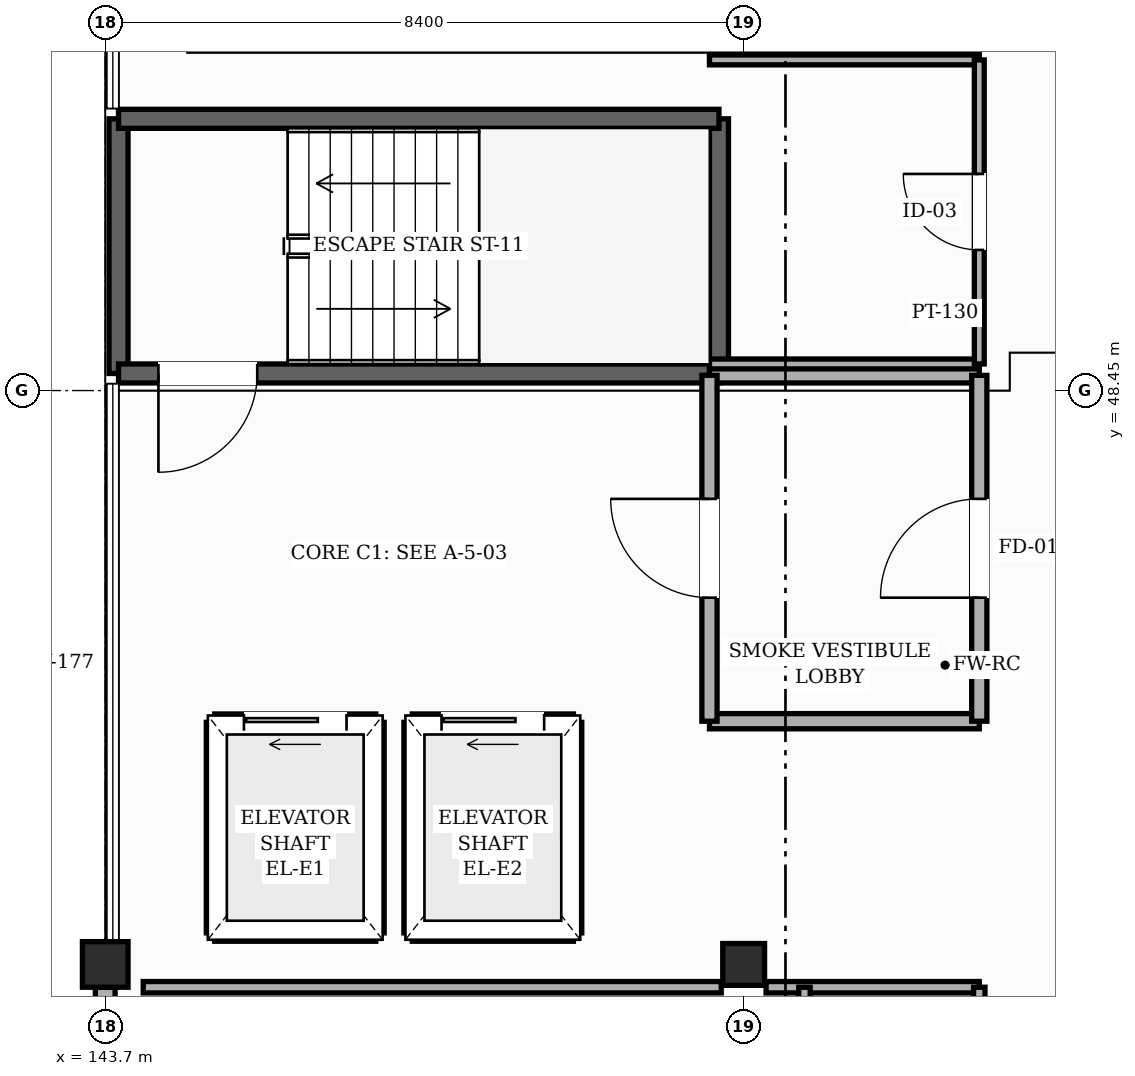
"""IFC4 building model, lengths in metres.
Left out: names, types, materials, properties, quantities, classifications, styles, units other than length and angle.
Written with IfcOpenShell. Run it as: python <this file> out.ifc"""

import sys

from ifc_helpers import new_model, si_unit, direction, frame, frame_2d, origin, origin_2d, place, context, subcontext, project, spatial, rectangle, hollow_rectangle, extrude, element, fill, save


model = new_model("IFC4")
c1 = context("Model", 3, precision=1e-05, world=origin(), true_north=direction((0.0, 1.0)))
c2 = subcontext(c1, "Body", "Model", "MODEL_VIEW")
j1 = project(units=[si_unit("LENGTHUNIT", "METRE"), si_unit("PLANEANGLEUNIT", "RADIAN")], contexts=[c1])
p1 = place(None, origin())
s1 = spatial("IfcSite", under=j1, at=p1, CompositionType="ELEMENT")
p2 = place(p1, origin())
s2 = spatial("IfcBuilding", under=s1, at=p2, CompositionType="ELEMENT")
p3 = place(p2, frame((0.0, 0.0, 24.6)))
s3 = spatial("IfcBuildingStorey", under=s2, at=p3, CompositionType="ELEMENT", Elevation=24.6)
p4 = place(p3, frame((143.7, 40.9, 0.0), z_axis=(0.0, 0.0, 1.0), x_axis=(1.0, 0.0, 0.0)))
e1 = element("IfcColumn", 1, at=p4, inside=s3, PredefinedType="COLUMN", context=c2, shape_type="SweptSolid", body=[
    extrude(hollow_rectangle(XDim=0.6, YDim=0.6, WallThickness=0.025, InnerFilletRadius=0.025, OuterFilletRadius=0.05, at=origin_2d()), origin(), (0.0, 0.0, 1.0), 3.6),
])
p5 = place(p3, frame((152.1, 40.9, 0.0), z_axis=(0.0, 0.0, 1.0), x_axis=(1.0, 0.0, 0.0)))
e2 = element("IfcColumn", 2, at=p5, inside=s3, PredefinedType="COLUMN", context=c2, shape_type="SweptSolid", body=[
    extrude(hollow_rectangle(XDim=0.55, YDim=0.55, WallThickness=0.022, InnerFilletRadius=0.022, OuterFilletRadius=0.044, at=origin_2d()), origin(), (0.0, 0.0, 1.0), 3.6),
])
p6 = place(p3, frame((143.7, 32.3, 0.0), z_axis=(0.0, 0.0, 1.0), x_axis=(0.0, 1.0, 0.0)))
e3 = element("IfcWall", 3, at=p6, inside=s3, PredefinedType="SOLIDWALL", context=c2, shape_type="SweptSolid", body=[
    extrude(rectangle(XDim=8.3, YDim=0.26, at=frame_2d((4.15, 0.0))), origin(), (0.0, 0.0, 1.0), 2.655),
])
p7 = place(p6, frame((0.325, 0.0, 0.85)))
e4 = element("IfcOpeningElement", 4, at=p7, cuts=e3, PredefinedType="OPENING", context=c2, shape_type="SweptSolid", body=[
    extrude(rectangle(XDim=0.85, YDim=1.35, at=frame_2d((0.425, 0.675))), frame((0.0, 0.14, 0.0), z_axis=(0.0, -1.0, 0.0), x_axis=(1.0, 0.0, 0.0)), (0.0, 0.0, 1.0), 0.28),
])
p8 = place(p6, frame((2.475, 0.0, 0.85)))
e5 = element("IfcOpeningElement", 5, at=p8, cuts=e3, PredefinedType="OPENING", context=c2, shape_type="SweptSolid", body=[
    extrude(rectangle(XDim=1.45, YDim=1.35, at=frame_2d((0.725, 0.675))), frame((0.0, 0.14, 0.0), z_axis=(0.0, -1.0, 0.0), x_axis=(1.0, 0.0, 0.0)), (0.0, 0.0, 1.0), 0.28),
])
p9 = place(p6, frame((5.775, 0.0, 0.85)))
e6 = element("IfcOpeningElement", 6, at=p9, cuts=e3, PredefinedType="OPENING", context=c2, shape_type="SweptSolid", body=[
    extrude(rectangle(XDim=1.65, YDim=1.35, at=frame_2d((0.825, 0.675))), frame((0.0, 0.14, 0.0), z_axis=(0.0, -1.0, 0.0), x_axis=(1.0, 0.0, 0.0)), (0.0, 0.0, 1.0), 0.28),
])
for number, where, z_axis, x_axis in (
    (7, (143.875, 48.675, 0.0), (0.0, 0.0, 1.0), (0.0, 1.0, 0.0)),
    (8, (151.775, 52.025, 0.0), (0.0, 0.0, 1.0), (0.0, -1.0, 0.0)),
):
    element("IfcWall", number, at=place(p3, frame(where, z_axis=z_axis, x_axis=x_axis)), inside=s3, PredefinedType="SHEAR", context=c2, shape_type="SweptSolid", body=[
        extrude(rectangle(XDim=3.35, YDim=0.25, at=frame_2d((1.675, 0.0))), origin(), (0.0, 0.0, 1.0), 3.38),
    ])
p10 = place(p3, frame((151.775, 48.675, 0.0), z_axis=(0.0, 0.0, 1.0), x_axis=(-1.0, 0.0, 0.0)))
e9 = element("IfcWall", 9, at=p10, inside=s3, PredefinedType="SHEAR", context=c2, shape_type="SweptSolid", body=[
    extrude(rectangle(XDim=7.9, YDim=0.25, at=frame_2d((3.95, 0.0))), origin(), (0.0, 0.0, 1.0), 3.38),
])
p11 = place(p10, frame((6.075, 0.0, 0.0)))
e10 = element("IfcOpeningElement", 10, at=p11, cuts=e9, PredefinedType="OPENING", context=c2, shape_type="SweptSolid", body=[
    extrude(rectangle(XDim=1.3, YDim=2.2, at=frame_2d((0.65, 1.1))), frame((0.0, 0.135, 0.0), z_axis=(0.0, -1.0, 0.0), x_axis=(1.0, 0.0, 0.0)), (0.0, 0.0, 1.0), 0.27),
])
p12 = place(p3, frame((143.875, 52.025, 0.0), z_axis=(0.0, 0.0, 1.0), x_axis=(1.0, 0.0, 0.0)))
e11 = element("IfcWall", 11, at=p12, inside=s3, PredefinedType="SHEAR", context=c2, shape_type="SweptSolid", body=[
    extrude(rectangle(XDim=7.9, YDim=0.25, at=frame_2d((3.95, 0.0))), origin(), (0.0, 0.0, 1.0), 3.38),
])
p13 = place(p3, frame((145.14, 44.085, 0.0), z_axis=(0.0, 0.0, 1.0), x_axis=(1.0, 0.0, 0.0)))
e12 = element("IfcWall", 12, at=p13, inside=s3, PredefinedType="SHEAR", context=c2, shape_type="SweptSolid", body=[
    extrude(rectangle(XDim=2.12, YDim=0.22, at=frame_2d((1.06, 0.0))), origin(), (0.0, 0.0, 1.0), 3.38),
])
p14 = place(p13, frame((0.385, 0.0, 0.0)))
e13 = element("IfcOpeningElement", 13, at=p14, cuts=e12, PredefinedType="OPENING", context=c2, shape_type="SweptSolid", body=[
    extrude(rectangle(XDim=1.35, YDim=2.3, at=frame_2d((0.675, 1.15))), frame((0.0, 0.12, 0.0), z_axis=(0.0, -1.0, 0.0), x_axis=(1.0, 0.0, 0.0)), (0.0, 0.0, 1.0), 0.24),
])
p15 = place(p3, frame((145.14, 41.315, 0.0), z_axis=(0.0, 0.0, 1.0), x_axis=(1.0, 0.0, 0.0)))
e14 = element("IfcWall", 14, at=p15, inside=s3, PredefinedType="SHEAR", context=c2, shape_type="SweptSolid", body=[
    extrude(rectangle(XDim=2.12, YDim=0.22, at=frame_2d((1.06, 0.0))), origin(), (0.0, 0.0, 1.0), 3.38),
])
for number, where, z_axis, x_axis in (
    (15, (147.26, 41.315, 0.0), (0.0, 0.0, 1.0), (0.0, 1.0, 0.0)),
    (16, (145.14, 41.315, 0.0), (0.0, 0.0, 1.0), (0.0, 1.0, 0.0)),
):
    element("IfcWall", number, at=place(p3, frame(where, z_axis=z_axis, x_axis=x_axis)), inside=s3, PredefinedType="SHEAR", context=c2, shape_type="SweptSolid", body=[
        extrude(rectangle(XDim=2.77, YDim=0.22, at=frame_2d((1.385, 0.0))), origin(), (0.0, 0.0, 1.0), 3.38),
    ])
p16 = place(p3, frame((147.74, 44.085, 0.0), z_axis=(0.0, 0.0, 1.0), x_axis=(1.0, 0.0, 0.0)))
e17 = element("IfcWall", 17, at=p16, inside=s3, PredefinedType="SHEAR", context=c2, shape_type="SweptSolid", body=[
    extrude(rectangle(XDim=2.12, YDim=0.22, at=frame_2d((1.06, 0.0))), origin(), (0.0, 0.0, 1.0), 3.38),
])
p17 = place(p16, frame((0.385, 0.0, 0.0)))
e18 = element("IfcOpeningElement", 18, at=p17, cuts=e17, PredefinedType="OPENING", context=c2, shape_type="SweptSolid", body=[
    extrude(rectangle(XDim=1.35, YDim=2.3, at=frame_2d((0.675, 1.15))), frame((0.0, 0.12, 0.0), z_axis=(0.0, -1.0, 0.0), x_axis=(1.0, 0.0, 0.0)), (0.0, 0.0, 1.0), 0.24),
])
p18 = place(p3, frame((147.74, 41.315, 0.0), z_axis=(0.0, 0.0, 1.0), x_axis=(1.0, 0.0, 0.0)))
e19 = element("IfcWall", 19, at=p18, inside=s3, PredefinedType="SHEAR", context=c2, shape_type="SweptSolid", body=[
    extrude(rectangle(XDim=2.12, YDim=0.22, at=frame_2d((1.06, 0.0))), origin(), (0.0, 0.0, 1.0), 3.38),
])
for number, where, z_axis, x_axis in (
    (20, (149.86, 41.315, 0.0), (0.0, 0.0, 1.0), (0.0, 1.0, 0.0)),
    (21, (147.74, 41.315, 0.0), (0.0, 0.0, 1.0), (0.0, 1.0, 0.0)),
):
    element("IfcWall", number, at=place(p3, frame(where, z_axis=z_axis, x_axis=x_axis)), inside=s3, PredefinedType="SHEAR", context=c2, shape_type="SweptSolid", body=[
        extrude(rectangle(XDim=2.77, YDim=0.22, at=frame_2d((1.385, 0.0))), origin(), (0.0, 0.0, 1.0), 3.38),
    ])
p19 = place(p3, frame((144.2, 40.6, 0.0), z_axis=(0.0, 0.0, 1.0), x_axis=(1.0, 0.0, 0.0)))
e22 = element("IfcWall", 22, at=p19, inside=s3, PredefinedType="PARTITIONING", context=c2, shape_type="SweptSolid", body=[
    extrude(rectangle(XDim=7.605, YDim=0.15, at=frame_2d((3.802, 0.0))), origin(), (0.0, 0.0, 1.0), 2.805),
])
p20 = place(p3, frame((152.395, 40.6, 0.0), z_axis=(0.0, 0.0, 1.0), x_axis=(1.0, 0.0, 0.0)))
e23 = element("IfcWall", 23, at=p20, inside=s3, PredefinedType="PARTITIONING", context=c2, shape_type="SweptSolid", body=[
    extrude(rectangle(XDim=2.805, YDim=0.15, at=frame_2d((1.402, 0.0))), origin(), (0.0, 0.0, 1.0), 2.805),
])
for number, where, z_axis, x_axis in (
    (24, (151.65, 44.1, 0.0), (0.0, 0.0, 1.0), (1.0, 0.0, 0.0)),
    (25, (151.65, 48.65, 0.0), (0.0, 0.0, 1.0), (1.0, 0.0, 0.0)),
):
    element("IfcWall", number, at=place(p3, frame(where, z_axis=z_axis, x_axis=x_axis)), inside=s3, PredefinedType="SOLIDWALL", context=c2, shape_type="SweptSolid", body=[
        extrude(rectangle(XDim=3.55, YDim=0.2, at=frame_2d((1.775, 0.0))), origin(), (0.0, 0.0, 1.0), 3.365),
    ])
for number, where, z_axis, x_axis in (
    (26, (151.65, 48.8, 0.0), (0.0, 0.0, 1.0), (1.0, 0.0, 0.0)),
    (27, (151.65, 52.8, 0.0), (0.0, 0.0, 1.0), (1.0, 0.0, 0.0)),
):
    element("IfcWall", number, at=place(p3, frame(where, z_axis=z_axis, x_axis=x_axis)), inside=s3, PredefinedType="PARTITIONING", context=c2, shape_type="SweptSolid", body=[
        extrude(rectangle(XDim=3.55, YDim=0.13, at=frame_2d((1.775, 0.0))), origin(), (0.0, 0.0, 1.0), 3.365),
    ])
p21 = place(p3, frame((151.65, 44.1, 0.0), z_axis=(0.0, 0.0, 1.0), x_axis=(0.0, 1.0, 0.0)))
e28 = element("IfcWall", 28, at=p21, inside=s3, PredefinedType="SOLIDWALL", context=c2, shape_type="SweptSolid", body=[
    extrude(rectangle(XDim=4.55, YDim=0.2, at=frame_2d((2.275, 0.0))), origin(), (0.0, 0.0, 1.0), 3.365),
])
p22 = place(p21, frame((1.625, 0.0, 0.0)))
e29 = element("IfcOpeningElement", 29, at=p22, cuts=e28, PredefinedType="OPENING", context=c2, shape_type="SweptSolid", body=[
    extrude(rectangle(XDim=1.3, YDim=2.2, at=frame_2d((0.65, 1.1))), frame((0.0, 0.11, 0.0), z_axis=(0.0, -1.0, 0.0), x_axis=(1.0, 0.0, 0.0)), (0.0, 0.0, 1.0), 0.22),
])
p23 = place(p3, frame((152.9, 38.95, 0.0), z_axis=(0.0, 0.0, 1.0), x_axis=(0.0, 1.0, 0.0)))
e30 = element("IfcWall", 30, at=p23, inside=s3, PredefinedType="PARTITIONING", context=c2, shape_type="SweptSolid", body=[
    extrude(rectangle(XDim=1.65, YDim=0.15, at=frame_2d((0.825, 0.0))), origin(), (0.0, 0.0, 1.0), 3.365),
])
p24 = place(p3, frame((155.2, 30.4, 0.0), z_axis=(0.0, 0.0, 1.0), x_axis=(0.0, 1.0, 0.0)))
e31 = element("IfcWall", 31, at=p24, inside=s3, PredefinedType="PARTITIONING", context=c2, shape_type="SweptSolid", body=[
    extrude(rectangle(XDim=10.2, YDim=0.15, at=frame_2d((5.1, 0.0))), origin(), (0.0, 0.0, 1.0), 3.365),
])
p25 = place(p24, frame((0.4, 0.0, 0.0)))
e32 = element("IfcOpeningElement", 32, at=p25, cuts=e31, PredefinedType="OPENING", context=c2, shape_type="SweptSolid", body=[
    extrude(rectangle(XDim=0.95, YDim=2.15, at=frame_2d((0.475, 1.075))), frame((0.0, 0.085, 0.0), z_axis=(0.0, -1.0, 0.0), x_axis=(1.0, 0.0, 0.0)), (0.0, 0.0, 1.0), 0.17),
])
p26 = place(p24, frame((3.8, 0.0, 0.0)))
e33 = element("IfcOpeningElement", 33, at=p26, cuts=e31, PredefinedType="OPENING", context=c2, shape_type="SweptSolid", body=[
    extrude(rectangle(XDim=0.95, YDim=2.15, at=frame_2d((0.475, 1.075))), frame((0.0, 0.085, 0.0), z_axis=(0.0, -1.0, 0.0), x_axis=(1.0, 0.0, 0.0)), (0.0, 0.0, 1.0), 0.17),
])
p27 = place(p24, frame((7.2, 0.0, 0.0)))
e34 = element("IfcOpeningElement", 34, at=p27, cuts=e31, PredefinedType="OPENING", context=c2, shape_type="SweptSolid", body=[
    extrude(rectangle(XDim=0.95, YDim=2.15, at=frame_2d((0.475, 1.075))), frame((0.0, 0.085, 0.0), z_axis=(0.0, -1.0, 0.0), x_axis=(1.0, 0.0, 0.0)), (0.0, 0.0, 1.0), 0.17),
])
p28 = place(p3, frame((155.2, 44.1, 0.0), z_axis=(0.0, 0.0, 1.0), x_axis=(0.0, 1.0, 0.0)))
e35 = element("IfcWall", 35, at=p28, inside=s3, PredefinedType="SOLIDWALL", context=c2, shape_type="SweptSolid", body=[
    extrude(rectangle(XDim=4.55, YDim=0.2, at=frame_2d((2.275, 0.0))), origin(), (0.0, 0.0, 1.0), 3.365),
])
p29 = place(p28, frame((1.625, 0.0, 0.0)))
e36 = element("IfcOpeningElement", 36, at=p29, cuts=e35, PredefinedType="OPENING", context=c2, shape_type="SweptSolid", body=[
    extrude(rectangle(XDim=1.3, YDim=2.2, at=frame_2d((0.65, 1.1))), frame((0.0, 0.11, 0.0), z_axis=(0.0, -1.0, 0.0), x_axis=(1.0, 0.0, 0.0)), (0.0, 0.0, 1.0), 0.22),
])
p30 = place(p3, frame((155.2, 48.8, 0.0), z_axis=(0.0, 0.0, 1.0), x_axis=(0.0, 1.0, 0.0)))
e37 = element("IfcWall", 37, at=p30, inside=s3, PredefinedType="PARTITIONING", context=c2, shape_type="SweptSolid", body=[
    extrude(rectangle(XDim=4.0, YDim=0.13, at=frame_2d((2.0, 0.0))), origin(), (0.0, 0.0, 1.0), 3.365),
])
p31 = place(p30, frame((1.5, 0.0, 0.0)))
e38 = element("IfcOpeningElement", 38, at=p31, cuts=e37, PredefinedType="OPENING", context=c2, shape_type="SweptSolid", body=[
    extrude(rectangle(XDim=1.0, YDim=2.18, at=frame_2d((0.5, 1.09))), frame((0.0, 0.075, 0.0), z_axis=(0.0, -1.0, 0.0), x_axis=(1.0, 0.0, 0.0)), (0.0, 0.0, 1.0), 0.15),
])
p32 = place(p11, origin())
e39 = element("IfcDoor", 39, at=p32, inside=s3, OperationType="SINGLE_SWING_RIGHT", PredefinedType="DOOR", context=c2, shape_type="SweptSolid", body=[
    extrude(rectangle(XDim=1.3, YDim=2.2, at=frame_2d((0.65, 1.1))), frame((0.0, 0.025, 0.0), z_axis=(0.0, -1.0, 0.0), x_axis=(1.0, 0.0, 0.0)), (0.0, 0.0, 1.0), 0.05),
])
fill(e10, e39)
p33 = place(p14, origin())
e40 = element("IfcDoor", 40, at=p33, inside=s3, OperationType="SLIDING_TO_LEFT", PredefinedType="DOOR", context=c2, shape_type="SweptSolid", body=[
    extrude(rectangle(XDim=1.35, YDim=2.3, at=frame_2d((0.675, 1.15))), frame((0.0, 0.025, 0.0), z_axis=(0.0, -1.0, 0.0), x_axis=(1.0, 0.0, 0.0)), (0.0, 0.0, 1.0), 0.05),
])
fill(e13, e40)
p34 = place(p17, origin())
e41 = element("IfcDoor", 41, at=p34, inside=s3, OperationType="SLIDING_TO_LEFT", PredefinedType="DOOR", context=c2, shape_type="SweptSolid", body=[
    extrude(rectangle(XDim=1.35, YDim=2.3, at=frame_2d((0.675, 1.15))), frame((0.0, 0.025, 0.0), z_axis=(0.0, -1.0, 0.0), x_axis=(1.0, 0.0, 0.0)), (0.0, 0.0, 1.0), 0.05),
])
fill(e18, e41)
p35 = place(p22, origin())
e42 = element("IfcDoor", 42, at=p35, inside=s3, OperationType="SINGLE_SWING_RIGHT", PredefinedType="DOOR", context=c2, shape_type="SweptSolid", body=[
    extrude(rectangle(XDim=1.3, YDim=2.2, at=frame_2d((0.65, 1.1))), frame((0.0, 0.025, 0.0), z_axis=(0.0, -1.0, 0.0), x_axis=(1.0, 0.0, 0.0)), (0.0, 0.0, 1.0), 0.05),
])
fill(e29, e42)
p36 = place(p29, origin())
e43 = element("IfcDoor", 43, at=p36, inside=s3, OperationType="SINGLE_SWING_LEFT", PredefinedType="DOOR", context=c2, shape_type="SweptSolid", body=[
    extrude(rectangle(XDim=1.3, YDim=2.2, at=frame_2d((0.65, 1.1))), frame((0.0, 0.025, 0.0), z_axis=(0.0, -1.0, 0.0), x_axis=(1.0, 0.0, 0.0)), (0.0, 0.0, 1.0), 0.05),
])
fill(e36, e43)
p37 = place(p31, origin())
e44 = element("IfcDoor", 44, at=p37, inside=s3, OperationType="SINGLE_SWING_RIGHT", PredefinedType="DOOR", context=c2, shape_type="SweptSolid", body=[
    extrude(rectangle(XDim=1.0, YDim=2.18, at=frame_2d((0.5, 1.09))), frame((0.0, 0.025, 0.0), z_axis=(0.0, -1.0, 0.0), x_axis=(1.0, 0.0, 0.0)), (0.0, 0.0, 1.0), 0.05),
])
fill(e38, e44)
save(model, sys.argv[1])
